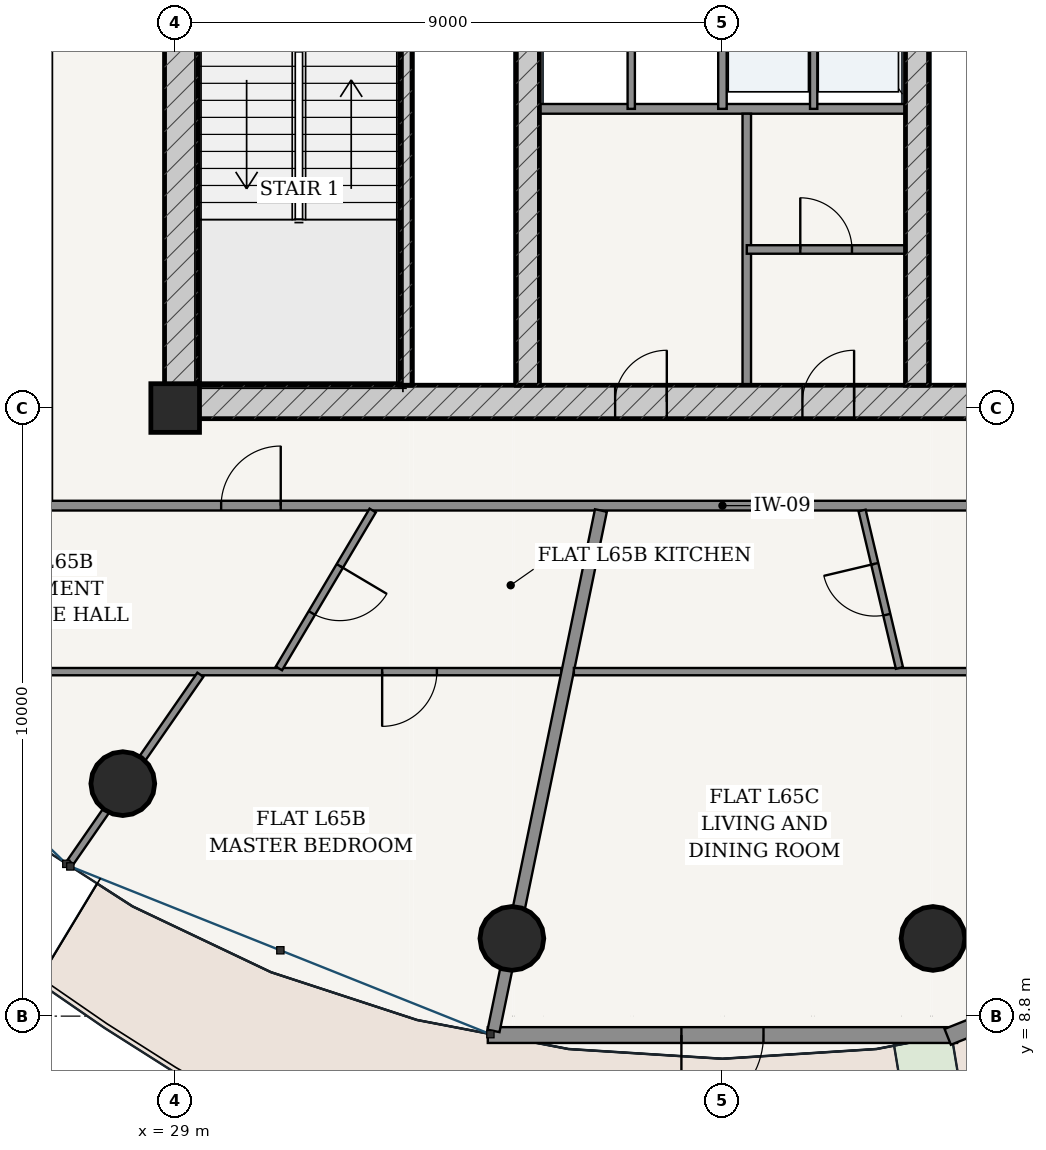
"""IFC4 building model, lengths in metres.
Left out: names, types, materials, properties, quantities, classifications, styles, units other than length and angle.
Written with IfcOpenShell. Run it as: python <this file> out.ifc"""

import sys

from ifc_helpers import new_model, si_unit, direction, frame, frame_2d, origin, origin_2d, place, context, subcontext, project, spatial, rectangle, hollow_circle, extrude, source, transform, mapped, element, fill, save


model = new_model("IFC4")
c1 = context("Model", 3, precision=1e-05, world=origin(), true_north=direction((-0.2419218956, 0.970295726276)))
c2 = subcontext(c1, "Body", "Model", "MODEL_VIEW")
j1 = project(units=[si_unit("LENGTHUNIT", "METRE"), si_unit("PLANEANGLEUNIT", "RADIAN")], contexts=[c1])
p1 = place(None, origin())
s1 = spatial("IfcSite", under=j1, at=p1, CompositionType="ELEMENT")
p2 = place(p1, origin())
s2 = spatial("IfcBuilding", under=s1, at=p2, CompositionType="ELEMENT")
p3 = place(p2, frame((0.0, 0.0, 248.2)))
s3 = spatial("IfcBuildingStorey", under=s2, at=p3, CompositionType="ELEMENT", Elevation=248.2)
p4 = place(p3, frame((29.0, 18.8, 0.0), z_axis=(0.0, 0.0, 1.0), x_axis=(1.0, 0.0, 0.0)))
e1 = element("IfcColumn", 1, at=p4, inside=s3, PredefinedType="COLUMN", context=c2, shape_type="SweptSolid", body=[
    extrude(rectangle(XDim=0.8, YDim=0.8, at=origin_2d()), origin(), (0.0, 0.0, 1.0), 3.75),
])
p5 = place(p3, frame((28.825, 18.9, 0.0), z_axis=(0.0, 0.0, 1.0), x_axis=(1.0, 0.0, 0.0)))
e2 = element("IfcWall", 2, at=p5, inside=s3, PredefinedType="SHEAR", context=c2, shape_type="SweptSolid", body=[
    extrude(rectangle(XDim=18.35, YDim=0.55, at=frame_2d((9.175, 0.0))), origin(), (0.0, 0.0, 1.0), 3.49),
])
p6 = place(p5, frame((7.41, 0.0, 0.0)))
e3 = element("IfcOpeningElement", 3, at=p6, cuts=e2, PredefinedType="OPENING", context=c2, shape_type="SweptSolid", body=[
    extrude(rectangle(XDim=0.85, YDim=2.1, at=frame_2d((0.425, 1.05))), frame((0.0, 0.285, 0.0), z_axis=(0.0, -1.0, 0.0), x_axis=(1.0, 0.0, 0.0)), (0.0, 0.0, 1.0), 0.57),
])
p7 = place(p5, frame((10.49, 0.0, 0.0)))
e4 = element("IfcOpeningElement", 4, at=p7, cuts=e2, PredefinedType="OPENING", context=c2, shape_type="SweptSolid", body=[
    extrude(rectangle(XDim=0.85, YDim=2.1, at=frame_2d((0.425, 1.05))), frame((0.0, 0.285, 0.0), z_axis=(0.0, -1.0, 0.0), x_axis=(1.0, 0.0, 0.0)), (0.0, 0.0, 1.0), 0.57),
])
p8 = place(p3, frame((29.1, 19.175, 0.0), z_axis=(0.0, 0.0, 1.0), x_axis=(0.0, 1.0, 0.0)))
e5 = element("IfcWall", 5, at=p8, inside=s3, PredefinedType="SHEAR", context=c2, shape_type="SweptSolid", body=[
    extrude(rectangle(XDim=15.25, YDim=0.55, at=frame_2d((7.625, 0.0))), origin(), (0.0, 0.0, 1.0), 3.49),
])
p9 = place(p8, frame((9.875, 0.0, 0.0)))
e6 = element("IfcOpeningElement", 6, at=p9, cuts=e5, PredefinedType="OPENING", context=c2, shape_type="SweptSolid", body=[
    extrude(rectangle(XDim=1.5, YDim=2.2, at=frame_2d((0.75, 1.1))), frame((0.0, 0.285, 0.0), z_axis=(0.0, -1.0, 0.0), x_axis=(1.0, 0.0, 0.0)), (0.0, 0.0, 1.0), 0.57),
])
p10 = place(p3, frame((32.795, 19.175, 0.0), z_axis=(0.0, 0.0, 1.0), x_axis=(0.0, 1.0, 0.0)))
e7 = element("IfcWall", 7, at=p10, inside=s3, PredefinedType="SOLIDWALL", context=c2, shape_type="SweptSolid", body=[
    extrude(rectangle(XDim=7.375, YDim=0.2, at=frame_2d((3.688, 0.0))), origin(), (0.0, 0.0, 1.0), 3.49),
])
p11 = place(p3, frame((34.8, 19.175, 0.0), z_axis=(0.0, 0.0, 1.0), x_axis=(0.0, 1.0, 0.0)))
e8 = element("IfcWall", 8, at=p11, inside=s3, PredefinedType="SHEAR", context=c2, shape_type="SweptSolid", body=[
    extrude(rectangle(XDim=15.25, YDim=0.38, at=frame_2d((7.625, 0.0))), origin(), (0.0, 0.0, 1.0), 3.49),
])
p12 = place(p11, frame((7.8, 0.0, 0.0)))
e9 = element("IfcOpeningElement", 9, at=p12, cuts=e8, PredefinedType="OPENING", context=c2, shape_type="SweptSolid", body=[
    extrude(rectangle(XDim=1.05, YDim=2.15, at=frame_2d((0.525, 1.075))), frame((0.0, 0.2, 0.0), z_axis=(0.0, -1.0, 0.0), x_axis=(1.0, 0.0, 0.0)), (0.0, 0.0, 1.0), 0.4),
])
p13 = place(p3, frame((41.2, 19.175, 0.0), z_axis=(0.0, 0.0, 1.0), x_axis=(0.0, 1.0, 0.0)))
e10 = element("IfcWall", 10, at=p13, inside=s3, PredefinedType="SHEAR", context=c2, shape_type="SweptSolid", body=[
    extrude(rectangle(XDim=15.25, YDim=0.38, at=frame_2d((7.625, 0.0))), origin(), (0.0, 0.0, 1.0), 3.49),
])
p14 = place(p13, frame((7.8, 0.0, 0.0)))
e11 = element("IfcOpeningElement", 11, at=p14, cuts=e10, PredefinedType="OPENING", context=c2, shape_type="SweptSolid", body=[
    extrude(rectangle(XDim=1.05, YDim=2.15, at=frame_2d((0.525, 1.075))), frame((0.0, 0.2, 0.0), z_axis=(0.0, -1.0, 0.0), x_axis=(1.0, 0.0, 0.0)), (0.0, 0.0, 1.0), 0.4),
])
for number, where, z_axis, x_axis in (
    (12, (28.139, 12.624, 0.0), (0.0, 0.0, 1.0), (1.0, 0.0, 0.0)),
    (13, (34.537, 10.078, 0.0), (0.0, 0.0, 1.0), (1.0, 0.0, 0.0)),
    (14, (41.463, 10.078, 0.0), (0.0, 0.0, 1.0), (1.0, 0.0, 0.0)),
):
    element("IfcColumn", number, at=place(p3, frame(where, z_axis=z_axis, x_axis=x_axis)), inside=s3, PredefinedType="COLUMN", context=c2, shape_type="SweptSolid", body=[
        extrude(hollow_circle(Radius=0.525, WallThickness=0.035, at=origin_2d()), origin(), (0.0, 0.0, 1.0), 3.75),
    ])
p15 = place(p3, frame((34.141, 8.489, 0.0), z_axis=(0.0, 0.0, 1.0), x_axis=(1.0, 0.0, 0.0)))
e15 = element("IfcWall", 15, at=p15, inside=s3, PredefinedType="SOLIDWALL", context=c2, shape_type="SweptSolid", body=[
    extrude(rectangle(XDim=7.718, YDim=0.26, at=frame_2d((3.859, 0.0))), origin(), (0.0, 0.0, 1.0), 3.49),
])
p16 = place(p15, frame((3.184, 0.0, 0.0)))
e16 = element("IfcOpeningElement", 16, at=p16, cuts=e15, PredefinedType="OPENING", context=c2, shape_type="SweptSolid", body=[
    extrude(rectangle(XDim=1.35, YDim=2.2, at=frame_2d((0.675, 1.1))), frame((0.0, 0.14, 0.0), z_axis=(0.0, -1.0, 0.0), x_axis=(1.0, 0.0, 0.0)), (0.0, 0.0, 1.0), 0.28),
])
p17 = place(p3, frame((41.705, 8.459, 0.0), z_axis=(0.0, 0.0, 1.0), x_axis=(0.92871332341, 0.370798547626, 0.0)))
e17 = element("IfcWall", 17, at=p17, inside=s3, PredefinedType="SOLIDWALL", context=c2, shape_type="SweptSolid", body=[
    extrude(rectangle(XDim=7.678, YDim=0.28, at=frame_2d((3.839, 0.0))), origin(), (0.0, 0.0, 1.0), 3.49),
])
p18 = place(p17, frame((1.298, 0.0, 0.85)))
e18 = element("IfcOpeningElement", 18, at=p18, cuts=e17, PredefinedType="OPENING", context=c2, shape_type="SweptSolid", body=[
    extrude(rectangle(XDim=1.55, YDim=1.95, at=frame_2d((0.775, 0.975))), frame((0.0, 0.15, 0.0), z_axis=(0.0, -1.0, 0.0), x_axis=(1.0, 0.0, 0.0)), (0.0, 0.0, 1.0), 0.3),
])
p19 = place(p17, frame((4.83, 0.0, 0.85)))
e19 = element("IfcOpeningElement", 19, at=p19, cuts=e17, PredefinedType="OPENING", context=c2, shape_type="SweptSolid", body=[
    extrude(rectangle(XDim=1.55, YDim=1.95, at=frame_2d((0.775, 0.975))), frame((0.0, 0.15, 0.0), z_axis=(0.0, -1.0, 0.0), x_axis=(1.0, 0.0, 0.0)), (0.0, 0.0, 1.0), 0.3),
])
p20 = place(p3, frame((34.99, 23.72, 0.0), z_axis=(0.0, 0.0, 1.0), x_axis=(1.0, 0.0, 0.0)))
e20 = element("IfcWall", 20, at=p20, inside=s3, PredefinedType="PARTITIONING", context=c2, shape_type="SweptSolid", body=[
    extrude(rectangle(XDim=6.02, YDim=0.16, at=frame_2d((3.01, 0.0))), origin(), (0.0, 0.0, 1.0), 3.49),
])
p21 = place(p3, frame((36.5, 23.72, 0.0), z_axis=(0.0, 0.0, 1.0), x_axis=(0.0, 1.0, 0.0)))
e21 = element("IfcWall", 21, at=p21, inside=s3, PredefinedType="PARTITIONING", context=c2, shape_type="SweptSolid", body=[
    extrude(rectangle(XDim=2.56, YDim=0.12, at=frame_2d((1.28, 0.0))), origin(), (0.0, 0.0, 1.0), 3.49),
])
p22 = place(p3, frame((38.0, 23.72, 0.0), z_axis=(0.0, 0.0, 1.0), x_axis=(0.0, 1.0, 0.0)))
e22 = element("IfcWall", 22, at=p22, inside=s3, PredefinedType="PARTITIONING", context=c2, shape_type="SweptSolid", body=[
    extrude(rectangle(XDim=2.56, YDim=0.14, at=frame_2d((1.28, 0.0))), origin(), (0.0, 0.0, 1.0), 3.49),
])
p23 = place(p3, frame((39.5, 23.72, 0.0), z_axis=(0.0, 0.0, 1.0), x_axis=(0.0, 1.0, 0.0)))
e23 = element("IfcWall", 23, at=p23, inside=s3, PredefinedType="PARTITIONING", context=c2, shape_type="SweptSolid", body=[
    extrude(rectangle(XDim=2.56, YDim=0.12, at=frame_2d((1.28, 0.0))), origin(), (0.0, 0.0, 1.0), 3.49),
])
p24 = place(p3, frame((38.4, 19.175, 0.0), z_axis=(0.0, 0.0, 1.0), x_axis=(0.0, 1.0, 0.0)))
e24 = element("IfcWall", 24, at=p24, inside=s3, PredefinedType="PARTITIONING", context=c2, shape_type="SweptSolid", body=[
    extrude(rectangle(XDim=4.465, YDim=0.14, at=frame_2d((2.232, 0.0))), origin(), (0.0, 0.0, 1.0), 3.49),
])
p25 = place(p3, frame((38.4, 21.407, 0.0), z_axis=(0.0, 0.0, 1.0), x_axis=(1.0, 0.0, 0.0)))
e25 = element("IfcWall", 25, at=p25, inside=s3, PredefinedType="PARTITIONING", context=c2, shape_type="SweptSolid", body=[
    extrude(rectangle(XDim=2.61, YDim=0.14, at=frame_2d((1.305, 0.0))), origin(), (0.0, 0.0, 1.0), 3.49),
])
p26 = place(p25, frame((0.88, 0.0, 0.0)))
e26 = element("IfcOpeningElement", 26, at=p26, cuts=e25, PredefinedType="OPENING", context=c2, shape_type="SweptSolid", body=[
    extrude(rectangle(XDim=0.85, YDim=2.1, at=frame_2d((0.425, 1.05))), frame((0.0, 0.08, 0.0), z_axis=(0.0, -1.0, 0.0), x_axis=(1.0, 0.0, 0.0)), (0.0, 0.0, 1.0), 0.16),
])
p27 = place(p3, frame((26.895, 17.195, 0.0), z_axis=(0.0, 0.0, 1.0), x_axis=(1.0, 0.0, 0.0)))
e27 = element("IfcWall", 27, at=p27, inside=s3, PredefinedType="PARTITIONING", context=c2, shape_type="SweptSolid", body=[
    extrude(rectangle(XDim=22.21, YDim=0.16, at=frame_2d((11.105, 0.0))), origin(), (0.0, 0.0, 1.0), 3.015),
])
p28 = place(p27, frame((2.861, 0.0, 0.0)))
e28 = element("IfcOpeningElement", 28, at=p28, cuts=e27, PredefinedType="OPENING", context=c2, shape_type="SweptSolid", body=[
    extrude(rectangle(XDim=0.98, YDim=2.2, at=frame_2d((0.49, 1.1))), frame((0.0, 0.09, 0.0), z_axis=(0.0, -1.0, 0.0), x_axis=(1.0, 0.0, 0.0)), (0.0, 0.0, 1.0), 0.18),
])
p29 = place(p27, frame((16.97, 0.0, 0.0)))
e29 = element("IfcOpeningElement", 29, at=p29, cuts=e27, PredefinedType="OPENING", context=c2, shape_type="SweptSolid", body=[
    extrude(rectangle(XDim=0.98, YDim=2.2, at=frame_2d((0.49, 1.1))), frame((0.0, 0.09, 0.0), z_axis=(0.0, -1.0, 0.0), x_axis=(1.0, 0.0, 0.0)), (0.0, 0.0, 1.0), 0.18),
])
p30 = place(p3, frame((26.895, 17.275, 0.0), z_axis=(0.0, 0.0, 1.0), x_axis=(0.0, 1.0, 0.0)))
e30 = element("IfcWall", 30, at=p30, inside=s3, PredefinedType="PARTITIONING", context=c2, shape_type="SweptSolid", body=[
    extrude(rectangle(XDim=13.925, YDim=0.16, at=frame_2d((6.962, 0.0))), origin(), (0.0, 0.0, 1.0), 3.015),
])
p31 = place(p3, frame((35.353, 14.465, 0.0), z_axis=(0.0, 0.0, 1.0), x_axis=(-1.0, 0.0, 0.0)))
e31 = element("IfcWall", 31, at=p31, inside=s3, PredefinedType="PARTITIONING", context=c2, shape_type="SweptSolid", body=[
    extrude(rectangle(XDim=11.188, YDim=0.12, at=frame_2d((5.594, 0.0))), origin(), (0.0, 0.0, 1.0), 3.015),
])
p32 = place(p31, frame((2.049, 0.0, 0.0)))
e32 = element("IfcOpeningElement", 32, at=p32, cuts=e31, PredefinedType="OPENING", context=c2, shape_type="SweptSolid", body=[
    extrude(rectangle(XDim=0.9, YDim=2.15, at=frame_2d((0.45, 1.075))), frame((0.0, 0.07, 0.0), z_axis=(0.0, -1.0, 0.0), x_axis=(1.0, 0.0, 0.0)), (0.0, 0.0, 1.0), 0.14),
])
p33 = place(p3, frame((29.414, 14.414, 0.0), z_axis=(0.0, 0.0, 1.0), x_axis=(-0.569657021681, -0.821882520589, 0.0)))
e33 = element("IfcWall", 33, at=p33, inside=s3, PredefinedType="PARTITIONING", context=c2, shape_type="SweptSolid", body=[
    extrude(rectangle(XDim=3.748, YDim=0.12, at=frame_2d((1.874, 0.0))), origin(), (0.0, 0.0, 1.0), 3.015),
])
p34 = place(p3, frame((32.248, 17.115, 0.0), z_axis=(0.0, 0.0, 1.0), x_axis=(-0.510591051721, -0.85982369001, 0.0)))
e34 = element("IfcWall", 34, at=p34, inside=s3, PredefinedType="PARTITIONING", context=c2, shape_type="SweptSolid", body=[
    extrude(rectangle(XDim=3.02, YDim=0.12, at=frame_2d((1.51, 0.0))), origin(), (0.0, 0.0, 1.0), 3.209),
])
p35 = place(p34, frame((1.06, 0.0, 0.0)))
e35 = element("IfcOpeningElement", 35, at=p35, cuts=e34, PredefinedType="OPENING", context=c2, shape_type="SweptSolid", body=[
    extrude(rectangle(XDim=0.9, YDim=2.15, at=frame_2d((0.45, 1.075))), frame((0.0, 0.07, 0.0), z_axis=(0.0, -1.0, 0.0), x_axis=(1.0, 0.0, 0.0)), (0.0, 0.0, 1.0), 0.14),
])
p36 = place(p3, frame((36.001, 17.115, 0.0), z_axis=(0.0, 0.0, 1.0), x_axis=(-0.202108543081, -0.979363128167, 0.0)))
e36 = element("IfcWall", 36, at=p36, inside=s3, PredefinedType="PARTITIONING", context=c2, shape_type="SweptSolid", body=[
    extrude(rectangle(XDim=8.739, YDim=0.2, at=frame_2d((4.369, 0.0))), origin(), (0.0, 0.0, 1.0), 3.015),
])
p37 = place(p3, frame((51.835, 14.465, 0.0), z_axis=(0.0, 0.0, 1.0), x_axis=(-1.0, 0.0, 0.0)))
e37 = element("IfcWall", 37, at=p37, inside=s3, PredefinedType="PARTITIONING", context=c2, shape_type="SweptSolid", body=[
    extrude(rectangle(XDim=16.278, YDim=0.12, at=frame_2d((8.139, 0.0))), origin(), (0.0, 0.0, 1.0), 3.015),
])
p38 = place(p37, frame((7.665, 0.0, 0.0)))
e38 = element("IfcOpeningElement", 38, at=p38, cuts=e37, PredefinedType="OPENING", context=c2, shape_type="SweptSolid", body=[
    extrude(rectangle(XDim=0.9, YDim=2.15, at=frame_2d((0.45, 1.075))), frame((0.0, 0.07, 0.0), z_axis=(0.0, -1.0, 0.0), x_axis=(1.0, 0.0, 0.0)), (0.0, 0.0, 1.0), 0.14),
])
p39 = place(p3, frame((40.296, 17.115, 0.0), z_axis=(0.0, 0.0, 1.0), x_axis=(0.230710960444, -0.973022328999, 0.0)))
e39 = element("IfcWall", 39, at=p39, inside=s3, PredefinedType="PARTITIONING", context=c2, shape_type="SweptSolid", body=[
    extrude(rectangle(XDim=2.661, YDim=0.12, at=frame_2d((1.331, 0.0))), origin(), (0.0, 0.0, 1.0), 3.49),
])
p40 = place(p39, frame((0.901, 0.0, 0.0)))
e40 = element("IfcOpeningElement", 40, at=p40, cuts=e39, PredefinedType="OPENING", context=c2, shape_type="SweptSolid", body=[
    extrude(rectangle(XDim=0.86, YDim=2.15, at=frame_2d((0.43, 1.075))), frame((0.0, 0.07, 0.0), z_axis=(0.0, -1.0, 0.0), x_axis=(1.0, 0.0, 0.0)), (0.0, 0.0, 1.0), 0.14),
])
m1 = source(origin(), c2, "Body", "SweptSolid", [
    extrude(rectangle(XDim=1.35, YDim=2.2, at=frame_2d((0.675, 1.1))), frame((0.0, 0.025, 0.0), z_axis=(0.0, -1.0, 0.0), x_axis=(1.0, 0.0, 0.0)), (0.0, 0.0, 1.0), 0.05),
])
p41 = place(p16, frame((1.35, 0.0, 0.0), z_axis=(0.0, 0.0, 1.0), x_axis=(-1.0, 0.0, 0.0)))
e41 = element("IfcDoor", 41, at=p41, inside=s3, OperationType="SINGLE_SWING_RIGHT", PredefinedType="DOOR", context=c2, shape_type="MappedRepresentation", body=[
    mapped(m1, transform((0.0, 0.0, 0.0), scale=1.0)),
])
fill(e16, e41)
m2 = source(origin(), c2, "Body", "SweptSolid", [
    extrude(rectangle(XDim=0.85, YDim=2.1, at=frame_2d((0.425, 1.05))), frame((0.0, 0.025, 0.0), z_axis=(0.0, -1.0, 0.0), x_axis=(1.0, 0.0, 0.0)), (0.0, 0.0, 1.0), 0.05),
])
p42 = place(p6, origin())
e42 = element("IfcDoor", 42, at=p42, inside=s3, OperationType="SINGLE_SWING_RIGHT", PredefinedType="DOOR", context=c2, shape_type="MappedRepresentation", body=[
    mapped(m2, transform((0.0, 0.0, 0.0), scale=1.0)),
])
fill(e3, e42)
p43 = place(p7, origin())
e43 = element("IfcDoor", 43, at=p43, inside=s3, OperationType="SINGLE_SWING_RIGHT", PredefinedType="DOOR", context=c2, shape_type="MappedRepresentation", body=[
    mapped(m2, transform((0.0, 0.0, 0.0), scale=1.0)),
])
fill(e4, e43)
p44 = place(p26, origin())
e44 = element("IfcDoor", 44, at=p44, inside=s3, OperationType="SINGLE_SWING_LEFT", PredefinedType="DOOR", context=c2, shape_type="MappedRepresentation", body=[
    mapped(m2, transform((0.0, 0.0, 0.0), scale=1.0)),
])
fill(e26, e44)
m3 = source(origin(), c2, "Body", "SweptSolid", [
    extrude(rectangle(XDim=0.98, YDim=2.2, at=frame_2d((0.49, 1.1))), frame((0.0, 0.025, 0.0), z_axis=(0.0, -1.0, 0.0), x_axis=(1.0, 0.0, 0.0)), (0.0, 0.0, 1.0), 0.05),
])
p45 = place(p28, origin())
e45 = element("IfcDoor", 45, at=p45, inside=s3, OperationType="SINGLE_SWING_RIGHT", PredefinedType="DOOR", context=c2, shape_type="MappedRepresentation", body=[
    mapped(m3, transform((0.0, 0.0, 0.0), scale=1.0)),
])
fill(e28, e45)
m4 = source(origin(), c2, "Body", "SweptSolid", [
    extrude(rectangle(XDim=0.9, YDim=2.15, at=frame_2d((0.45, 1.075))), frame((0.0, 0.025, 0.0), z_axis=(0.0, -1.0, 0.0), x_axis=(1.0, 0.0, 0.0)), (0.0, 0.0, 1.0), 0.05),
])
p46 = place(p35, origin())
e46 = element("IfcDoor", 46, at=p46, inside=s3, OperationType="SINGLE_SWING_LEFT", PredefinedType="DOOR", context=c2, shape_type="MappedRepresentation", body=[
    mapped(m4, transform((0.0, 0.0, 0.0), scale=1.0)),
])
fill(e35, e46)
p47 = place(p32, origin())
e47 = element("IfcDoor", 47, at=p47, inside=s3, OperationType="SINGLE_SWING_RIGHT", PredefinedType="DOOR", context=c2, shape_type="MappedRepresentation", body=[
    mapped(m4, transform((0.0, 0.0, 0.0), scale=1.0)),
])
fill(e32, e47)
m5 = source(origin(), c2, "Body", "SweptSolid", [
    extrude(rectangle(XDim=0.86, YDim=2.15, at=frame_2d((0.43, 1.075))), frame((0.0, 0.025, 0.0), z_axis=(0.0, -1.0, 0.0), x_axis=(1.0, 0.0, 0.0)), (0.0, 0.0, 1.0), 0.05),
])
p48 = place(p40, frame((0.86, 0.0, 0.0), z_axis=(0.0, 0.0, 1.0), x_axis=(-1.0, 0.0, 0.0)))
e48 = element("IfcDoor", 48, at=p48, inside=s3, OperationType="SINGLE_SWING_RIGHT", PredefinedType="DOOR", context=c2, shape_type="MappedRepresentation", body=[
    mapped(m5, transform((0.0, 0.0, 0.0), scale=1.0)),
])
fill(e40, e48)
save(model, sys.argv[1])
